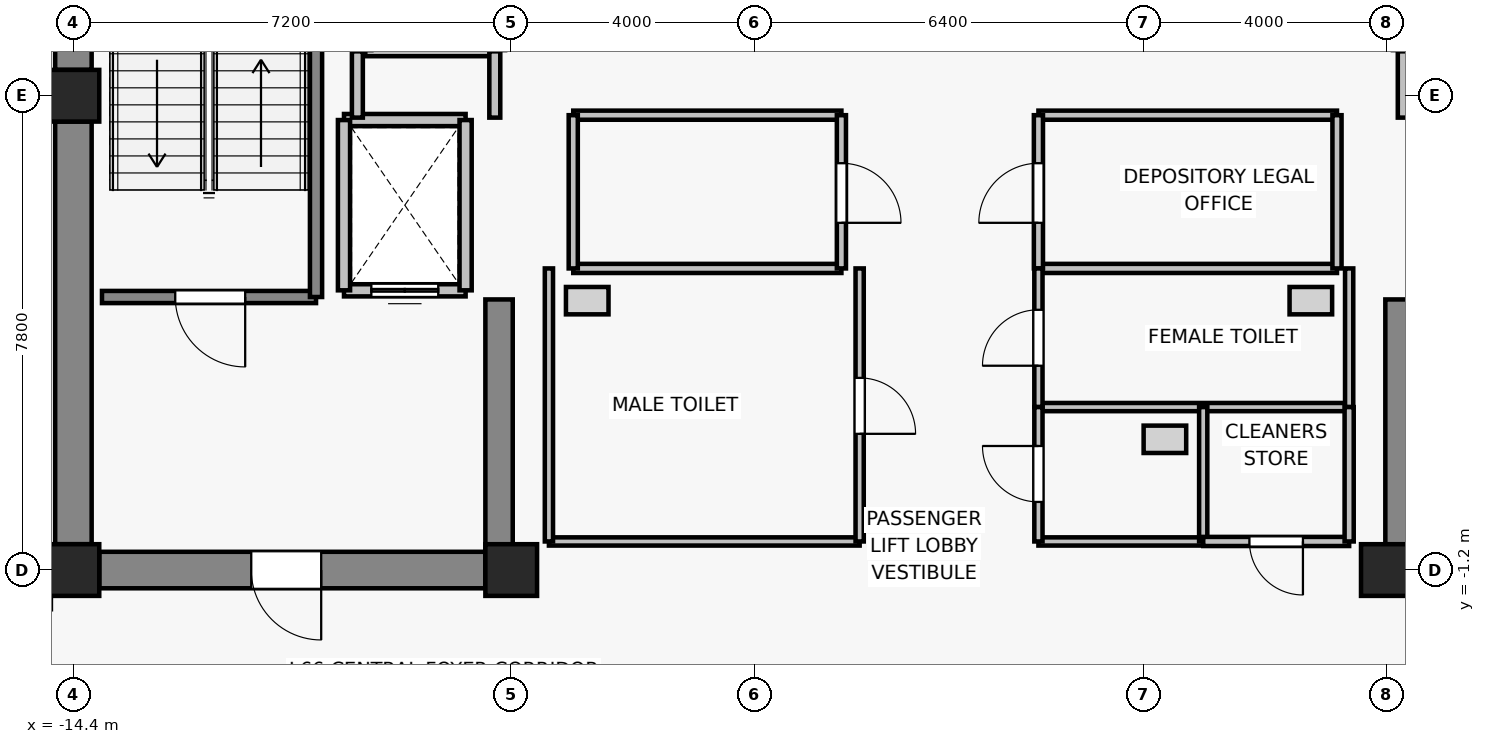
"""IFC4 building model, lengths in metres.
Left out: names, types, materials, properties, quantities, classifications, styles, units other than length and angle.
Written with IfcOpenShell. Run it as: python <this file> out.ifc"""

import sys

from ifc_helpers import new_model, si_unit, direction, frame, frame_2d, origin, origin_2d, place, context, subcontext, project, spatial, rectangle, extrude, source, transform, mapped, element, fill, save


model = new_model("IFC4")
c1 = context("Model", 3, precision=1e-05, world=origin(), true_north=direction((0.0, 1.0)))
c2 = subcontext(c1, "Body", "Model", "MODEL_VIEW")
j1 = project(units=[si_unit("LENGTHUNIT", "METRE"), si_unit("PLANEANGLEUNIT", "RADIAN")], contexts=[c1])
p1 = place(None, origin())
s1 = spatial("IfcSite", under=j1, at=p1, CompositionType="ELEMENT")
p2 = place(p1, origin())
s2 = spatial("IfcBuilding", under=s1, at=p2, CompositionType="ELEMENT")
p3 = place(p2, frame((0.0, 0.0, 235.3)))
s3 = spatial("IfcBuildingStorey", under=s2, at=p3, CompositionType="ELEMENT", Elevation=235.3)
for number, where, z_axis, x_axis in (
    (1, (-14.4, -1.2, 0.0), (0.0, 0.0, 1.0), (1.0, 0.0, 0.0)),
    (2, (-7.2, -1.2, 0.0), (0.0, 0.0, 1.0), (1.0, 0.0, 0.0)),
    (3, (7.2, -1.2, 0.0), (0.0, 0.0, 1.0), (1.0, 0.0, 0.0)),
    (4, (-14.4, 6.6, 0.0), (0.0, 0.0, 1.0), (1.0, 0.0, 0.0)),
):
    element("IfcColumn", number, at=place(p3, frame(where, z_axis=z_axis, x_axis=x_axis)), inside=s3, PredefinedType="COLUMN", context=c2, shape_type="SweptSolid", body=[
        extrude(rectangle(XDim=0.85, YDim=0.85, at=origin_2d()), origin(), (0.0, 0.0, 1.0), 3.3),
    ])
p4 = place(p3, frame((-14.4, -0.775, 0.0), z_axis=(0.0, 0.0, 1.0), x_axis=(0.0, 1.0, 0.0)))
e5 = element("IfcWall", 5, at=p4, inside=s3, PredefinedType="SHEAR", context=c2, shape_type="SweptSolid", body=[
    extrude(rectangle(XDim=6.95, YDim=0.6, at=frame_2d((3.475, 0.0))), origin(), (0.0, 0.0, 1.0), 3.075),
])
p5 = place(p3, frame((-14.4, 7.025, 0.0), z_axis=(0.0, 0.0, 1.0), x_axis=(0.0, 1.0, 0.0)))
e6 = element("IfcWall", 6, at=p5, inside=s3, PredefinedType="SHEAR", context=c2, shape_type="SweptSolid", body=[
    extrude(rectangle(XDim=6.05, YDim=0.6, at=frame_2d((3.025, 0.0))), origin(), (0.0, 0.0, 1.0), 3.075),
])
p6 = place(p3, frame((-7.625, -1.2, 0.0), z_axis=(0.0, 0.0, 1.0), x_axis=(-1.0, 0.0, 0.0)))
e7 = element("IfcWall", 7, at=p6, inside=s3, PredefinedType="SHEAR", context=c2, shape_type="SweptSolid", body=[
    extrude(rectangle(XDim=6.35, YDim=0.6, at=frame_2d((3.175, 0.0))), origin(), (0.0, 0.0, 1.0), 3.075),
])
p7 = place(p6, frame((2.7, 0.0, 0.0)))
e8 = element("IfcOpeningElement", 8, at=p7, cuts=e7, PredefinedType="OPENING", context=c2, shape_type="SweptSolid", body=[
    extrude(rectangle(XDim=1.15, YDim=2.15, at=frame_2d((0.575, 1.075))), frame((0.0, 0.31, 0.0), z_axis=(0.0, -1.0, 0.0), x_axis=(1.0, 0.0, 0.0)), (0.0, 0.0, 1.0), 0.62),
])
for number, where, z_axis, x_axis in (
    (9, (-7.4, -0.9, 0.0), (0.0, 0.0, 1.0), (0.0, 1.0, 0.0)),
    (10, (7.4, -0.9, 0.0), (0.0, 0.0, 1.0), (0.0, 1.0, 0.0)),
):
    element("IfcWall", number, at=place(p3, frame(where, z_axis=z_axis, x_axis=x_axis)), inside=s3, PredefinedType="SHEAR", context=c2, shape_type="SweptSolid", body=[
        extrude(rectangle(XDim=4.15, YDim=0.45, at=frame_2d((2.075, 0.0))), origin(), (0.0, 0.0, 1.0), 3.075),
    ])
p8 = place(p3, frame((-7.95, 3.4, 0.0), z_axis=(0.0, 0.0, 1.0), x_axis=(-1.0, 0.0, 0.0)))
e11 = element("IfcWall", 11, at=p8, inside=s3, PredefinedType="SOLIDWALL", context=c2, shape_type="SweptSolid", body=[
    extrude(rectangle(XDim=2.0, YDim=0.2, at=frame_2d((1.0, 0.0))), origin(), (0.0, 0.0, 1.0), 3.075),
])
p9 = place(p8, frame((0.45, 0.0, 0.0)))
e12 = element("IfcOpeningElement", 12, at=p9, cuts=e11, PredefinedType="OPENING", context=c2, shape_type="SweptSolid", body=[
    extrude(rectangle(XDim=1.1, YDim=2.2, at=frame_2d((0.55, 1.1))), frame((0.0, 0.11, 0.0), z_axis=(0.0, -1.0, 0.0), x_axis=(1.0, 0.0, 0.0)), (0.0, 0.0, 1.0), 0.22),
])
p10 = place(p3, frame((-9.95, 6.2, 0.0), z_axis=(0.0, 0.0, 1.0), x_axis=(1.0, 0.0, 0.0)))
e13 = element("IfcWall", 13, at=p10, inside=s3, PredefinedType="SOLIDWALL", context=c2, shape_type="SweptSolid", body=[
    extrude(rectangle(XDim=2.0, YDim=0.2, at=frame_2d((1.0, 0.0))), origin(), (0.0, 0.0, 1.0), 3.075),
])
for number, where, z_axis, x_axis in (
    (14, (-9.95, 3.4, 0.0), (0.0, 0.0, 1.0), (0.0, 1.0, 0.0)),
    (15, (-7.95, 6.2, 0.0), (0.0, 0.0, 1.0), (0.0, -1.0, 0.0)),
):
    element("IfcWall", number, at=place(p3, frame(where, z_axis=z_axis, x_axis=x_axis)), inside=s3, PredefinedType="SOLIDWALL", context=c2, shape_type="SweptSolid", body=[
        extrude(rectangle(XDim=2.8, YDim=0.2, at=frame_2d((1.4, 0.0))), origin(), (0.0, 0.0, 1.0), 3.075),
    ])
for number, where, z_axis, x_axis in (
    (16, (-7.4, 7.35, 0.0), (0.0, 0.0, 1.0), (-1.0, 0.0, 0.0)),
    (17, (9.6, 7.35, 0.0), (0.0, 0.0, 1.0), (-1.0, 0.0, 0.0)),
):
    element("IfcWall", number, at=place(p3, frame(where, z_axis=z_axis, x_axis=x_axis)), inside=s3, PredefinedType="SOLIDWALL", context=c2, shape_type="SweptSolid", body=[
        extrude(rectangle(XDim=2.2, YDim=0.2, at=frame_2d((1.1, 0.0))), origin(), (0.0, 0.0, 1.0), 2.615),
    ])
p11 = place(p3, frame((-10.41, 3.29, 0.0), z_axis=(0.0, 0.0, 1.0), x_axis=(-1.0, 0.0, 0.0)))
e18 = element("IfcWall", 18, at=p11, inside=s3, PredefinedType="SOLIDWALL", context=c2, shape_type="SweptSolid", body=[
    extrude(rectangle(XDim=3.52, YDim=0.2, at=frame_2d((1.76, 0.0))), origin(), (0.0, 0.0, 1.0), 3.075),
])
p12 = place(p11, frame((1.165, 0.0, 0.0)))
e19 = element("IfcOpeningElement", 19, at=p12, cuts=e18, PredefinedType="OPENING", context=c2, shape_type="SweptSolid", body=[
    extrude(rectangle(XDim=1.15, YDim=2.15, at=frame_2d((0.575, 1.075))), frame((0.0, 0.11, 0.0), z_axis=(0.0, -1.0, 0.0), x_axis=(1.0, 0.0, 0.0)), (0.0, 0.0, 1.0), 0.22),
])
p13 = place(p3, frame((-10.41, 12.13, 0.0), z_axis=(0.0, 0.0, 1.0), x_axis=(0.0, -1.0, 0.0)))
e20 = element("IfcWall", 20, at=p13, inside=s3, PredefinedType="SOLIDWALL", context=c2, shape_type="SweptSolid", body=[
    extrude(rectangle(XDim=8.84, YDim=0.2, at=frame_2d((4.42, 0.0))), origin(), (0.0, 0.0, 1.0), 3.075),
])
p14 = place(p3, frame((-9.73, 6.24, 0.0), z_axis=(0.0, 0.0, 1.0), x_axis=(0.0, 1.0, 0.0)))
e21 = element("IfcWall", 21, at=p14, inside=s3, PredefinedType="PARTITIONING", context=c2, shape_type="SweptSolid", body=[
    extrude(rectangle(XDim=1.09, YDim=0.18, at=frame_2d((0.545, 0.0))), origin(), (0.0, 0.0, 1.0), 3.075),
])
for number, where, z_axis, x_axis in (
    (22, (-7.47, 7.33, 0.0), (0.0, 0.0, 1.0), (0.0, -1.0, 0.0)),
    (23, (7.47, 6.24, 0.0), (0.0, 0.0, 1.0), (0.0, 1.0, 0.0)),
):
    element("IfcWall", number, at=place(p3, frame(where, z_axis=z_axis, x_axis=x_axis)), inside=s3, PredefinedType="PARTITIONING", context=c2, shape_type="SweptSolid", body=[
        extrude(rectangle(XDim=1.09, YDim=0.18, at=frame_2d((0.545, 0.0))), origin(), (0.0, 0.0, 1.0), 2.615),
    ])
for number, where, z_axis, x_axis in (
    (24, (-1.77, 3.76, 0.0), (0.0, 0.0, 1.0), (-1.0, 0.0, 0.0)),
    (25, (-6.18, 6.28, 0.0), (0.0, 0.0, 1.0), (1.0, 0.0, 0.0)),
):
    element("IfcWall", number, at=place(p3, frame(where, z_axis=z_axis, x_axis=x_axis)), inside=s3, PredefinedType="PARTITIONING", context=c2, shape_type="SweptSolid", body=[
        extrude(rectangle(XDim=4.41, YDim=0.15, at=frame_2d((2.205, 0.0))), origin(), (0.0, 0.0, 1.0), 3.075),
    ])
p15 = place(p3, frame((-6.18, 3.76, 0.0), z_axis=(0.0, 0.0, 1.0), x_axis=(0.0, 1.0, 0.0)))
e26 = element("IfcWall", 26, at=p15, inside=s3, PredefinedType="PARTITIONING", context=c2, shape_type="SweptSolid", body=[
    extrude(rectangle(XDim=2.52, YDim=0.15, at=frame_2d((1.26, 0.0))), origin(), (0.0, 0.0, 1.0), 3.075),
])
p16 = place(p3, frame((-1.77, 6.28, 0.0), z_axis=(0.0, 0.0, 1.0), x_axis=(0.0, -1.0, 0.0)))
e27 = element("IfcWall", 27, at=p16, inside=s3, PredefinedType="PARTITIONING", context=c2, shape_type="SweptSolid", body=[
    extrude(rectangle(XDim=2.52, YDim=0.15, at=frame_2d((1.26, 0.0))), origin(), (0.0, 0.0, 1.0), 3.075),
])
p17 = place(p16, frame((0.79, 0.0, 0.0)))
e28 = element("IfcOpeningElement", 28, at=p17, cuts=e27, PredefinedType="OPENING", context=c2, shape_type="SweptSolid", body=[
    extrude(rectangle(XDim=0.98, YDim=2.15, at=frame_2d((0.49, 1.075))), frame((0.0, 0.085, 0.0), z_axis=(0.0, -1.0, 0.0), x_axis=(1.0, 0.0, 0.0)), (0.0, 0.0, 1.0), 0.17),
])
for number, where, z_axis, x_axis in (
    (29, (6.38, 3.76, 0.0), (0.0, 0.0, 1.0), (-1.0, 0.0, 0.0)),
    (30, (1.47, 6.28, 0.0), (0.0, 0.0, 1.0), (1.0, 0.0, 0.0)),
):
    element("IfcWall", number, at=place(p3, frame(where, z_axis=z_axis, x_axis=x_axis)), inside=s3, PredefinedType="PARTITIONING", context=c2, shape_type="SweptSolid", body=[
        extrude(rectangle(XDim=4.91, YDim=0.15, at=frame_2d((2.455, 0.0))), origin(), (0.0, 0.0, 1.0), 3.075),
    ])
p18 = place(p3, frame((1.47, 3.76, 0.0), z_axis=(0.0, 0.0, 1.0), x_axis=(0.0, 1.0, 0.0)))
e31 = element("IfcWall", 31, at=p18, inside=s3, PredefinedType="PARTITIONING", context=c2, shape_type="SweptSolid", body=[
    extrude(rectangle(XDim=2.52, YDim=0.15, at=frame_2d((1.26, 0.0))), origin(), (0.0, 0.0, 1.0), 3.075),
])
p19 = place(p18, frame((0.75, 0.0, 0.0)))
e32 = element("IfcOpeningElement", 32, at=p19, cuts=e31, PredefinedType="OPENING", context=c2, shape_type="SweptSolid", body=[
    extrude(rectangle(XDim=0.98, YDim=2.15, at=frame_2d((0.49, 1.075))), frame((0.0, 0.085, 0.0), z_axis=(0.0, -1.0, 0.0), x_axis=(1.0, 0.0, 0.0)), (0.0, 0.0, 1.0), 0.17),
])
p20 = place(p3, frame((6.38, 6.28, 0.0), z_axis=(0.0, 0.0, 1.0), x_axis=(0.0, -1.0, 0.0)))
e33 = element("IfcWall", 33, at=p20, inside=s3, PredefinedType="PARTITIONING", context=c2, shape_type="SweptSolid", body=[
    extrude(rectangle(XDim=2.52, YDim=0.15, at=frame_2d((1.26, 0.0))), origin(), (0.0, 0.0, 1.0), 3.075),
])
p21 = place(p3, frame((-1.47, -0.73, 0.0), z_axis=(0.0, 0.0, 1.0), x_axis=(-1.0, 0.0, 0.0)))
e34 = element("IfcWall", 34, at=p21, inside=s3, PredefinedType="PARTITIONING", context=c2, shape_type="SweptSolid", body=[
    extrude(rectangle(XDim=5.11, YDim=0.135, at=frame_2d((2.555, 0.0))), origin(), (0.0, 0.0, 1.0), 3.075),
])
p22 = place(p3, frame((-6.58, -0.73, 0.0), z_axis=(0.0, 0.0, 1.0), x_axis=(0.0, 1.0, 0.0)))
e35 = element("IfcWall", 35, at=p22, inside=s3, PredefinedType="PARTITIONING", context=c2, shape_type="SweptSolid", body=[
    extrude(rectangle(XDim=4.49, YDim=0.135, at=frame_2d((2.245, 0.0))), origin(), (0.0, 0.0, 1.0), 3.075),
])
p23 = place(p3, frame((-1.47, 3.76, 0.0), z_axis=(0.0, 0.0, 1.0), x_axis=(0.0, -1.0, 0.0)))
e36 = element("IfcWall", 36, at=p23, inside=s3, PredefinedType="PARTITIONING", context=c2, shape_type="SweptSolid", body=[
    extrude(rectangle(XDim=4.49, YDim=0.135, at=frame_2d((2.245, 0.0))), origin(), (0.0, 0.0, 1.0), 3.075),
])
p24 = place(p23, frame((1.8, 0.0, 0.0)))
e37 = element("IfcOpeningElement", 37, at=p24, cuts=e36, PredefinedType="OPENING", context=c2, shape_type="SweptSolid", body=[
    extrude(rectangle(XDim=0.92, YDim=2.1, at=frame_2d((0.46, 1.05))), frame((0.0, 0.077, 0.0), z_axis=(0.0, -1.0, 0.0), x_axis=(1.0, 0.0, 0.0)), (0.0, 0.0, 1.0), 0.155),
])
p25 = place(p3, frame((6.58, 1.48, 0.0), z_axis=(0.0, 0.0, 1.0), x_axis=(-1.0, 0.0, 0.0)))
e38 = element("IfcWall", 38, at=p25, inside=s3, PredefinedType="PARTITIONING", context=c2, shape_type="SweptSolid", body=[
    extrude(rectangle(XDim=5.11, YDim=0.135, at=frame_2d((2.555, 0.0))), origin(), (0.0, 0.0, 1.0), 3.075),
])
p26 = place(p3, frame((1.47, 1.48, 0.0), z_axis=(0.0, 0.0, 1.0), x_axis=(0.0, 1.0, 0.0)))
e39 = element("IfcWall", 39, at=p26, inside=s3, PredefinedType="PARTITIONING", context=c2, shape_type="SweptSolid", body=[
    extrude(rectangle(XDim=2.28, YDim=0.135, at=frame_2d((1.14, 0.0))), origin(), (0.0, 0.0, 1.0), 3.075),
])
p27 = place(p26, frame((0.68, 0.0, 0.0)))
e40 = element("IfcOpeningElement", 40, at=p27, cuts=e39, PredefinedType="OPENING", context=c2, shape_type="SweptSolid", body=[
    extrude(rectangle(XDim=0.92, YDim=2.1, at=frame_2d((0.46, 1.05))), frame((0.0, 0.077, 0.0), z_axis=(0.0, -1.0, 0.0), x_axis=(1.0, 0.0, 0.0)), (0.0, 0.0, 1.0), 0.155),
])
p28 = place(p3, frame((6.58, 3.76, 0.0), z_axis=(0.0, 0.0, 1.0), x_axis=(0.0, -1.0, 0.0)))
e41 = element("IfcWall", 41, at=p28, inside=s3, PredefinedType="PARTITIONING", context=c2, shape_type="SweptSolid", body=[
    extrude(rectangle(XDim=2.28, YDim=0.135, at=frame_2d((1.14, 0.0))), origin(), (0.0, 0.0, 1.0), 3.075),
])
p29 = place(p3, frame((4.18, -0.73, 0.0), z_axis=(0.0, 0.0, 1.0), x_axis=(-1.0, 0.0, 0.0)))
e42 = element("IfcWall", 42, at=p29, inside=s3, PredefinedType="PARTITIONING", context=c2, shape_type="SweptSolid", body=[
    extrude(rectangle(XDim=2.71, YDim=0.135, at=frame_2d((1.355, 0.0))), origin(), (0.0, 0.0, 1.0), 3.075),
])
p30 = place(p3, frame((1.47, -0.73, 0.0), z_axis=(0.0, 0.0, 1.0), x_axis=(0.0, 1.0, 0.0)))
e43 = element("IfcWall", 43, at=p30, inside=s3, PredefinedType="PARTITIONING", context=c2, shape_type="SweptSolid", body=[
    extrude(rectangle(XDim=2.21, YDim=0.135, at=frame_2d((1.105, 0.0))), origin(), (0.0, 0.0, 1.0), 3.075),
])
p31 = place(p30, frame((0.65, 0.0, 0.0)))
e44 = element("IfcOpeningElement", 44, at=p31, cuts=e43, PredefinedType="OPENING", context=c2, shape_type="SweptSolid", body=[
    extrude(rectangle(XDim=0.92, YDim=2.1, at=frame_2d((0.46, 1.05))), frame((0.0, 0.077, 0.0), z_axis=(0.0, -1.0, 0.0), x_axis=(1.0, 0.0, 0.0)), (0.0, 0.0, 1.0), 0.155),
])
p32 = place(p3, frame((4.18, 1.48, 0.0), z_axis=(0.0, 0.0, 1.0), x_axis=(0.0, -1.0, 0.0)))
e45 = element("IfcWall", 45, at=p32, inside=s3, PredefinedType="PARTITIONING", context=c2, shape_type="SweptSolid", body=[
    extrude(rectangle(XDim=2.21, YDim=0.135, at=frame_2d((1.105, 0.0))), origin(), (0.0, 0.0, 1.0), 3.075),
])
p33 = place(p3, frame((6.58, -0.73, 0.0), z_axis=(0.0, 0.0, 1.0), x_axis=(-1.0, 0.0, 0.0)))
e46 = element("IfcWall", 46, at=p33, inside=s3, PredefinedType="PARTITIONING", context=c2, shape_type="SweptSolid", body=[
    extrude(rectangle(XDim=2.4, YDim=0.15, at=frame_2d((1.2, 0.0))), origin(), (0.0, 0.0, 1.0), 3.075),
])
p34 = place(p33, frame((0.76, 0.0, 0.0)))
e47 = element("IfcOpeningElement", 47, at=p34, cuts=e46, PredefinedType="OPENING", context=c2, shape_type="SweptSolid", body=[
    extrude(rectangle(XDim=0.88, YDim=2.1, at=frame_2d((0.44, 1.05))), frame((0.0, 0.085, 0.0), z_axis=(0.0, -1.0, 0.0), x_axis=(1.0, 0.0, 0.0)), (0.0, 0.0, 1.0), 0.17),
])
p35 = place(p3, frame((6.58, 1.48, 0.0), z_axis=(0.0, 0.0, 1.0), x_axis=(0.0, -1.0, 0.0)))
e48 = element("IfcWall", 48, at=p35, inside=s3, PredefinedType="PARTITIONING", context=c2, shape_type="SweptSolid", body=[
    extrude(rectangle(XDim=2.21, YDim=0.15, at=frame_2d((1.105, 0.0))), origin(), (0.0, 0.0, 1.0), 3.075),
])
m1 = source(origin(), c2, "Body", "SweptSolid", [
    extrude(rectangle(XDim=1.1, YDim=2.2, at=frame_2d((0.55, 1.1))), frame((0.0, 0.025, 0.0), z_axis=(0.0, -1.0, 0.0), x_axis=(1.0, 0.0, 0.0)), (0.0, 0.0, 1.0), 0.05),
])
p36 = place(p9, origin())
e49 = element("IfcDoor", 49, at=p36, inside=s3, OperationType="DOUBLE_DOOR_SLIDING", PredefinedType="DOOR", context=c2, shape_type="MappedRepresentation", body=[
    mapped(m1, transform((0.0, 0.0, 0.0), x_axis=(1.0, 0.0, 0.0), y_axis=(0.0, 1.0, 0.0), z_axis=(0.0, 0.0, 1.0), scale=1.0)),
])
fill(e12, e49)
m2 = source(origin(), c2, "Body", "SweptSolid", [
    extrude(rectangle(XDim=1.15, YDim=2.15, at=frame_2d((0.575, 1.075))), frame((0.0, 0.025, 0.0), z_axis=(0.0, -1.0, 0.0), x_axis=(1.0, 0.0, 0.0)), (0.0, 0.0, 1.0), 0.05),
])
p37 = place(p12, origin())
e50 = element("IfcDoor", 50, at=p37, inside=s3, OperationType="SINGLE_SWING_LEFT", PredefinedType="DOOR", context=c2, shape_type="MappedRepresentation", body=[
    mapped(m2, transform((0.0, 0.0, 0.0), x_axis=(1.0, 0.0, 0.0), y_axis=(0.0, 1.0, 0.0), z_axis=(0.0, 0.0, 1.0), scale=1.0)),
])
fill(e19, e50)
p38 = place(p7, origin())
e51 = element("IfcDoor", 51, at=p38, inside=s3, OperationType="SINGLE_SWING_LEFT", PredefinedType="DOOR", context=c2, shape_type="MappedRepresentation", body=[
    mapped(m2, transform((0.0, 0.0, 0.0), x_axis=(1.0, 0.0, 0.0), y_axis=(0.0, 1.0, 0.0), z_axis=(0.0, 0.0, 1.0), scale=1.0)),
])
fill(e8, e51)
m3 = source(origin(), c2, "Body", "SweptSolid", [
    extrude(rectangle(XDim=0.98, YDim=2.15, at=frame_2d((0.49, 1.075))), frame((0.0, 0.025, 0.0), z_axis=(0.0, -1.0, 0.0), x_axis=(1.0, 0.0, 0.0)), (0.0, 0.0, 1.0), 0.05),
])
p39 = place(p17, origin())
e52 = element("IfcDoor", 52, at=p39, inside=s3, OperationType="SINGLE_SWING_RIGHT", PredefinedType="DOOR", context=c2, shape_type="MappedRepresentation", body=[
    mapped(m3, transform((0.0, 0.0, 0.0), x_axis=(1.0, 0.0, 0.0), y_axis=(0.0, 1.0, 0.0), z_axis=(0.0, 0.0, 1.0), scale=1.0)),
])
fill(e28, e52)
p40 = place(p19, origin())
e53 = element("IfcDoor", 53, at=p40, inside=s3, OperationType="SINGLE_SWING_LEFT", PredefinedType="DOOR", context=c2, shape_type="MappedRepresentation", body=[
    mapped(m3, transform((0.0, 0.0, 0.0), x_axis=(1.0, 0.0, 0.0), y_axis=(0.0, 1.0, 0.0), z_axis=(0.0, 0.0, 1.0), scale=1.0)),
])
fill(e32, e53)
m4 = source(origin(), c2, "Body", "SweptSolid", [
    extrude(rectangle(XDim=0.92, YDim=2.1, at=frame_2d((0.46, 1.05))), frame((0.0, 0.025, 0.0), z_axis=(0.0, -1.0, 0.0), x_axis=(1.0, 0.0, 0.0)), (0.0, 0.0, 1.0), 0.05),
])
p41 = place(p24, origin())
e54 = element("IfcDoor", 54, at=p41, inside=s3, OperationType="SINGLE_SWING_RIGHT", PredefinedType="DOOR", context=c2, shape_type="MappedRepresentation", body=[
    mapped(m4, transform((0.0, 0.0, 0.0), x_axis=(1.0, 0.0, 0.0), y_axis=(0.0, 1.0, 0.0), z_axis=(0.0, 0.0, 1.0), scale=1.0)),
])
fill(e37, e54)
p42 = place(p27, origin())
e55 = element("IfcDoor", 55, at=p42, inside=s3, OperationType="SINGLE_SWING_LEFT", PredefinedType="DOOR", context=c2, shape_type="MappedRepresentation", body=[
    mapped(m4, transform((0.0, 0.0, 0.0), x_axis=(1.0, 0.0, 0.0), y_axis=(0.0, 1.0, 0.0), z_axis=(0.0, 0.0, 1.0), scale=1.0)),
])
fill(e40, e55)
p43 = place(p31, origin())
e56 = element("IfcDoor", 56, at=p43, inside=s3, OperationType="SINGLE_SWING_RIGHT", PredefinedType="DOOR", context=c2, shape_type="MappedRepresentation", body=[
    mapped(m4, transform((0.0, 0.0, 0.0), x_axis=(1.0, 0.0, 0.0), y_axis=(0.0, 1.0, 0.0), z_axis=(0.0, 0.0, 1.0), scale=1.0)),
])
fill(e44, e56)
m5 = source(origin(), c2, "Body", "SweptSolid", [
    extrude(rectangle(XDim=0.88, YDim=2.1, at=frame_2d((0.44, 1.05))), frame((0.0, 0.025, 0.0), z_axis=(0.0, -1.0, 0.0), x_axis=(1.0, 0.0, 0.0)), (0.0, 0.0, 1.0), 0.05),
])
p44 = place(p34, origin())
e57 = element("IfcDoor", 57, at=p44, inside=s3, OperationType="SINGLE_SWING_LEFT", PredefinedType="DOOR", context=c2, shape_type="MappedRepresentation", body=[
    mapped(m5, transform((0.0, 0.0, 0.0), x_axis=(1.0, 0.0, 0.0), y_axis=(0.0, 1.0, 0.0), z_axis=(0.0, 0.0, 1.0), scale=1.0)),
])
fill(e47, e57)
save(model, sys.argv[1])
